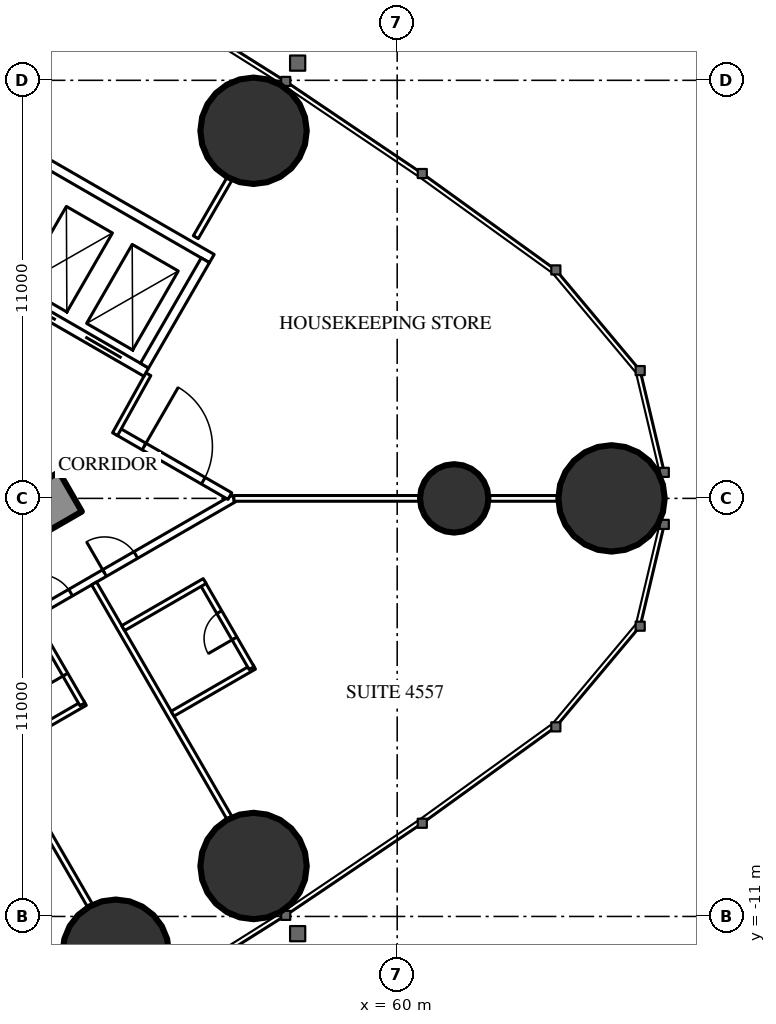
"""IFC4 building model, lengths in metres.
Left out: names, types, materials, properties, quantities, classifications, styles, units other than length and angle.
Written with IfcOpenShell. Run it as: python <this file> out.ifc"""

import sys

from ifc_helpers import new_model, si_unit, direction, frame, frame_2d, origin, origin_2d, place, context, subcontext, project, spatial, rectangle, circle, extrude, element, fill, save


model = new_model("IFC4")
c1 = context("Model", 3, precision=1e-05, world=origin(), true_north=direction((0.0, 1.0)))
c2 = subcontext(c1, "Body", "Model", "MODEL_VIEW")
j1 = project(units=[si_unit("LENGTHUNIT", "METRE"), si_unit("PLANEANGLEUNIT", "RADIAN")], contexts=[c1])
p1 = place(None, origin())
s1 = spatial("IfcSite", under=j1, at=p1, CompositionType="ELEMENT")
p2 = place(p1, origin())
s2 = spatial("IfcBuilding", under=s1, at=p2, CompositionType="ELEMENT")
p3 = place(p2, frame((0.0, 0.0, 170.3)))
s3 = spatial("IfcBuildingStorey", under=s2, at=p3, CompositionType="ELEMENT", Elevation=170.3)
for number, where, z_axis, x_axis in (
    (1, (65.64, 0.0, 0.0), (0.0, 0.0, 1.0), (1.0, 0.0, 0.0)),
    (2, (56.221, 9.672, 0.0), (0.0, 0.0, 1.0), (1.0, 0.0, 0.0)),
    (3, (52.594, -11.955, 0.0), (0.0, 0.0, 1.0), (1.0, 0.0, 0.0)),
    (4, (56.221, -9.672, 0.0), (0.0, 0.0, 1.0), (1.0, 0.0, 0.0)),
):
    element("IfcColumn", number, at=place(p3, frame(where, z_axis=z_axis, x_axis=x_axis)), inside=s3, PredefinedType="COLUMN", context=c2, shape_type="SweptSolid", body=[
        extrude(circle(Radius=1.4, at=origin_2d()), origin(), (0.0, 0.0, 1.0), 3.5),
    ])
p4 = place(p3, frame((61.5, 0.0, 0.0), z_axis=(0.0, 0.0, 1.0), x_axis=(1.0, 0.0, 0.0)))
e5 = element("IfcColumn", 5, at=p4, inside=s3, PredefinedType="COLUMN", context=c2, shape_type="SweptSolid", body=[
    extrude(circle(Radius=0.9, at=origin_2d()), origin(), (0.0, 0.0, 1.0), 3.5),
])
p5 = place(p3, frame((27.2, -13.8, 0.0), z_axis=(0.0, 0.0, 1.0), x_axis=(0.866027159892, 0.499996958321, 0.0)))
e6 = element("IfcWall", 6, at=p5, inside=s3, PredefinedType="SHEAR", context=c2, shape_type="SweptSolid", body=[
    extrude(rectangle(XDim=27.947, YDim=1.2, at=frame_2d((13.973, 0.0))), origin(), (0.0, 0.0, 1.0), 3.5),
])
p6 = place(p5, frame((4.6, 0.0, 0.0)))
e7 = element("IfcOpeningElement", 7, at=p6, cuts=e6, PredefinedType="OPENING", context=c2, shape_type="SweptSolid", body=[
    extrude(rectangle(XDim=1.0, YDim=2.2, at=frame_2d((0.5, 1.1))), frame((0.0, 0.61, 0.0), z_axis=(0.0, -1.0, 0.0), x_axis=(1.0, 0.0, 0.0)), (0.0, 0.0, 1.0), 1.22),
])
p7 = place(p5, frame((13.395, 0.0, 0.0)))
e8 = element("IfcOpeningElement", 8, at=p7, cuts=e6, PredefinedType="OPENING", context=c2, shape_type="SweptSolid", body=[
    extrude(rectangle(XDim=1.8, YDim=2.2, at=frame_2d((0.9, 1.1))), frame((0.0, 0.61, 0.0), z_axis=(0.0, -1.0, 0.0), x_axis=(1.0, 0.0, 0.0)), (0.0, 0.0, 1.0), 1.22),
])
p8 = place(p3, frame((27.959, -16.017, 0.0), z_axis=(0.0, 0.0, 1.0), x_axis=(0.866024151371, 0.500002169237, 0.0)))
e9 = element("IfcWall", 9, at=p8, inside=s3, PredefinedType="PARTITIONING", context=c2, shape_type="SweptSolid", body=[
    extrude(rectangle(XDim=32.034, YDim=0.2, at=frame_2d((16.017, 0.0))), origin(), (0.0, 0.0, 1.0), 3.25),
])
p9 = place(p8, frame((4.765, 0.0, 0.0)))
e10 = element("IfcOpeningElement", 10, at=p9, cuts=e9, PredefinedType="OPENING", context=c2, shape_type="SweptSolid", body=[
    extrude(rectangle(XDim=0.95, YDim=2.2, at=frame_2d((0.475, 1.1))), frame((0.0, 0.11, 0.0), z_axis=(0.0, -1.0, 0.0), x_axis=(1.0, 0.0, 0.0)), (0.0, 0.0, 1.0), 0.22),
])
p10 = place(p8, frame((9.215, 0.0, 0.0)))
e11 = element("IfcOpeningElement", 11, at=p10, cuts=e9, PredefinedType="OPENING", context=c2, shape_type="SweptSolid", body=[
    extrude(rectangle(XDim=1.0, YDim=2.2, at=frame_2d((0.5, 1.1))), frame((0.0, 0.11, 0.0), z_axis=(0.0, -1.0, 0.0), x_axis=(1.0, 0.0, 0.0)), (0.0, 0.0, 1.0), 0.22),
])
p11 = place(p8, frame((19.725, 0.0, 0.0)))
e12 = element("IfcOpeningElement", 12, at=p11, cuts=e9, PredefinedType="OPENING", context=c2, shape_type="SweptSolid", body=[
    extrude(rectangle(XDim=0.95, YDim=2.2, at=frame_2d((0.475, 1.1))), frame((0.0, 0.11, 0.0), z_axis=(0.0, -1.0, 0.0), x_axis=(1.0, 0.0, 0.0)), (0.0, 0.0, 1.0), 0.22),
])
p12 = place(p8, frame((26.125, 0.0, 0.0)))
e13 = element("IfcOpeningElement", 13, at=p12, cuts=e9, PredefinedType="OPENING", context=c2, shape_type="SweptSolid", body=[
    extrude(rectangle(XDim=0.95, YDim=2.2, at=frame_2d((0.475, 1.1))), frame((0.0, 0.11, 0.0), z_axis=(0.0, -1.0, 0.0), x_axis=(1.0, 0.0, 0.0)), (0.0, 0.0, 1.0), 0.22),
])
p13 = place(p8, frame((28.106, 0.0, 0.0)))
e14 = element("IfcOpeningElement", 14, at=p13, cuts=e9, PredefinedType="OPENING", context=c2, shape_type="SweptSolid", body=[
    extrude(rectangle(XDim=0.95, YDim=2.2, at=frame_2d((0.475, 1.1))), frame((0.0, 0.11, 0.0), z_axis=(0.0, -1.0, 0.0), x_axis=(1.0, 0.0, 0.0)), (0.0, 0.0, 1.0), 0.22),
])
p14 = place(p3, frame((48.275, -4.404, 0.0), z_axis=(0.0, 0.0, 1.0), x_axis=(0.500006004368, -0.866021937133, 0.0)))
e15 = element("IfcWall", 15, at=p14, inside=s3, PredefinedType="PARTITIONING", context=c2, shape_type="SweptSolid", body=[
    extrude(rectangle(XDim=7.279, YDim=0.15, at=frame_2d((3.64, 0.0))), origin(), (0.0, 0.0, 1.0), 2.3),
])
p15 = place(p3, frame((52.025, -2.238, 0.0), z_axis=(0.0, 0.0, 1.0), x_axis=(0.499983785035, -0.866034765296, 0.0)))
e16 = element("IfcWall", 16, at=p15, inside=s3, PredefinedType="PARTITIONING", context=c2, shape_type="SweptSolid", body=[
    extrude(rectangle(XDim=7.116, YDim=0.15, at=frame_2d((3.558, 0.0))), origin(), (0.0, 0.0, 1.0), 2.3),
])
p16 = place(p3, frame((55.702, 0.0, 0.0), z_axis=(0.0, 0.0, 1.0), x_axis=(1.0, 0.0, 0.0)))
e17 = element("IfcWall", 17, at=p16, inside=s3, PredefinedType="PARTITIONING", context=c2, shape_type="SweptSolid", body=[
    extrude(rectangle(XDim=8.518, YDim=0.15, at=frame_2d((4.259, 0.0))), origin(), (0.0, 0.0, 1.0), 2.3),
])
p17 = place(p3, frame((54.7, 6.872, 0.0), z_axis=(0.0, 0.0, 1.0), x_axis=(0.499989690894, 0.866031355668, 0.0)))
e18 = element("IfcWall", 18, at=p17, inside=s3, PredefinedType="PARTITIONING", context=c2, shape_type="SweptSolid", body=[
    extrude(rectangle(XDim=1.766, YDim=0.15, at=frame_2d((0.883, 0.0))), origin(), (0.0, 0.0, 1.0), 3.25),
])
p18 = place(p3, frame((52.639, 1.769, 0.0), z_axis=(0.0, 0.0, 1.0), x_axis=(0.866027340901, -0.4999966448, 0.0)))
e19 = element("IfcWall", 19, at=p18, inside=s3, PredefinedType="PARTITIONING", context=c2, shape_type="SweptSolid", body=[
    extrude(rectangle(XDim=3.417, YDim=0.2, at=frame_2d((1.708, 0.0))), origin(), (0.0, 0.0, 1.0), 3.25),
])
p19 = place(p18, frame((0.809, 0.0, 0.0)))
e20 = element("IfcOpeningElement", 20, at=p19, cuts=e19, PredefinedType="OPENING", context=c2, shape_type="SweptSolid", body=[
    extrude(rectangle(XDim=1.8, YDim=2.2, at=frame_2d((0.9, 1.1))), frame((0.0, 0.11, 0.0), z_axis=(0.0, -1.0, 0.0), x_axis=(1.0, 0.0, 0.0)), (0.0, 0.0, 1.0), 0.22),
])
p20 = place(p3, frame((52.576, 1.689, 0.0), z_axis=(0.0, 0.0, 1.0), x_axis=(0.485424724123, 0.874278466629, 0.0)))
e21 = element("IfcWall", 21, at=p20, inside=s3, PredefinedType="PARTITIONING", context=c2, shape_type="SweptSolid", body=[
    extrude(rectangle(XDim=1.805, YDim=0.15, at=frame_2d((0.903, 0.0))), origin(), (0.0, 0.0, 1.0), 3.25),
])
p21 = place(p3, frame((49.64, -6.618, 0.0), z_axis=(0.0, 0.0, 1.0), x_axis=(0.866006523861, 0.500032699561, 0.0)))
e22 = element("IfcWall", 22, at=p21, inside=s3, PredefinedType="PARTITIONING", context=c2, shape_type="SweptSolid", body=[
    extrude(rectangle(XDim=2.475, YDim=0.15, at=frame_2d((1.237, 0.0))), origin(), (0.0, 0.0, 1.0), 3.25),
])
p22 = place(p3, frame((50.418, -3.166, 0.0), z_axis=(0.0, 0.0, 1.0), x_axis=(0.499936506574, -0.866062058628, 0.0)))
e23 = element("IfcWall", 23, at=p22, inside=s3, PredefinedType="PARTITIONING", context=c2, shape_type="SweptSolid", body=[
    extrude(rectangle(XDim=2.6, YDim=0.15, at=frame_2d((1.3, 0.0))), origin(), (0.0, 0.0, 1.0), 3.25),
])
p23 = place(p22, frame((0.9, 0.0, 0.0)))
e24 = element("IfcOpeningElement", 24, at=p23, cuts=e23, PredefinedType="OPENING", context=c2, shape_type="SweptSolid", body=[
    extrude(rectangle(XDim=0.8, YDim=2.2, at=frame_2d((0.4, 1.1))), frame((0.0, 0.085, 0.0), z_axis=(0.0, -1.0, 0.0), x_axis=(1.0, 0.0, 0.0)), (0.0, 0.0, 1.0), 0.17),
])
p24 = place(p3, frame((54.09, -5.665, 0.0), z_axis=(0.0, 0.0, 1.0), x_axis=(0.866006523861, 0.500032699561, 0.0)))
e25 = element("IfcWall", 25, at=p24, inside=s3, PredefinedType="PARTITIONING", context=c2, shape_type="SweptSolid", body=[
    extrude(rectangle(XDim=2.475, YDim=0.15, at=frame_2d((1.237, 0.0))), origin(), (0.0, 0.0, 1.0), 3.25),
])
p25 = place(p3, frame((54.869, -2.213, 0.0), z_axis=(0.0, 0.0, 1.0), x_axis=(0.500047596559, -0.865997922154, 0.0)))
e26 = element("IfcWall", 26, at=p25, inside=s3, PredefinedType="PARTITIONING", context=c2, shape_type="SweptSolid", body=[
    extrude(rectangle(XDim=2.6, YDim=0.15, at=frame_2d((1.3, 0.0))), origin(), (0.0, 0.0, 1.0), 3.25),
])
p26 = place(p25, frame((0.9, 0.0, 0.0)))
e27 = element("IfcOpeningElement", 27, at=p26, cuts=e26, PredefinedType="OPENING", context=c2, shape_type="SweptSolid", body=[
    extrude(rectangle(XDim=0.8, YDim=2.2, at=frame_2d((0.4, 1.1))), frame((0.0, 0.085, 0.0), z_axis=(0.0, -1.0, 0.0), x_axis=(1.0, 0.0, 0.0)), (0.0, 0.0, 1.0), 0.17),
])
p27 = place(p3, frame((52.79, -3.413, 0.0), z_axis=(0.0, 0.0, 1.0), x_axis=(0.866006523861, 0.500032699561, 0.0)))
e28 = element("IfcWall", 28, at=p27, inside=s3, PredefinedType="PARTITIONING", context=c2, shape_type="SweptSolid", body=[
    extrude(rectangle(XDim=2.475, YDim=0.15, at=frame_2d((1.237, 0.0))), origin(), (0.0, 0.0, 1.0), 3.25),
])
p28 = place(p3, frame((47.681, 6.622, 0.0), z_axis=(0.0, 0.0, 1.0), x_axis=(0.86603344179, -0.499986077507, 0.0)))
e29 = element("IfcWall", 29, at=p28, inside=s3, PredefinedType="PARTITIONING", context=c2, shape_type="SweptSolid", body=[
    extrude(rectangle(XDim=6.6, YDim=0.25, at=frame_2d((3.3, 0.0))), origin(), (0.0, 0.0, 1.0), 3.25),
])
p29 = place(p28, frame((0.75, 0.0, 0.0)))
e30 = element("IfcOpeningElement", 30, at=p29, cuts=e29, PredefinedType="OPENING", context=c2, shape_type="SweptSolid", body=[
    extrude(rectangle(XDim=1.1, YDim=2.2, at=frame_2d((0.55, 1.1))), frame((0.0, 0.135, 0.0), z_axis=(0.0, -1.0, 0.0), x_axis=(1.0, 0.0, 0.0)), (0.0, 0.0, 1.0), 0.27),
])
p30 = place(p28, frame((2.75, 0.0, 0.0)))
e31 = element("IfcOpeningElement", 31, at=p30, cuts=e29, PredefinedType="OPENING", context=c2, shape_type="SweptSolid", body=[
    extrude(rectangle(XDim=1.1, YDim=2.2, at=frame_2d((0.55, 1.1))), frame((0.0, 0.135, 0.0), z_axis=(0.0, -1.0, 0.0), x_axis=(1.0, 0.0, 0.0)), (0.0, 0.0, 1.0), 0.27),
])
p31 = place(p28, frame((4.75, 0.0, 0.0)))
e32 = element("IfcOpeningElement", 32, at=p31, cuts=e29, PredefinedType="OPENING", context=c2, shape_type="SweptSolid", body=[
    extrude(rectangle(XDim=1.1, YDim=2.2, at=frame_2d((0.55, 1.1))), frame((0.0, 0.135, 0.0), z_axis=(0.0, -1.0, 0.0), x_axis=(1.0, 0.0, 0.0)), (0.0, 0.0, 1.0), 0.27),
])
p32 = place(p3, frame((49.406, 9.611, 0.0), z_axis=(0.0, 0.0, 1.0), x_axis=(0.86603344179, -0.499986077507, 0.0)))
e33 = element("IfcWall", 33, at=p32, inside=s3, PredefinedType="PARTITIONING", context=c2, shape_type="SweptSolid", body=[
    extrude(rectangle(XDim=6.6, YDim=0.25, at=frame_2d((3.3, 0.0))), origin(), (0.0, 0.0, 1.0), 3.25),
])
p33 = place(p3, frame((53.352, 3.493, 0.0), z_axis=(0.0, 0.0, 1.0), x_axis=(0.499872130319, 0.866099216793, 0.0)))
e34 = element("IfcWall", 34, at=p33, inside=s3, PredefinedType="PARTITIONING", context=c2, shape_type="SweptSolid", body=[
    extrude(rectangle(XDim=3.2, YDim=0.25, at=frame_2d((1.6, 0.0))), origin(), (0.0, 0.0, 1.0), 3.25),
])
p34 = place(p23, origin())
e35 = element("IfcDoor", 35, at=p34, inside=s3, OperationType="SINGLE_SWING_RIGHT", PredefinedType="DOOR", context=c2, shape_type="SweptSolid", body=[
    extrude(rectangle(XDim=0.8, YDim=2.2, at=frame_2d((0.4, 1.1))), frame((0.0, 0.025, 0.0), z_axis=(0.0, -1.0, 0.0), x_axis=(1.0, 0.0, 0.0)), (0.0, 0.0, 1.0), 0.05),
])
fill(e24, e35)
p35 = place(p12, origin())
e36 = element("IfcDoor", 36, at=p35, inside=s3, OperationType="SINGLE_SWING_LEFT", PredefinedType="DOOR", context=c2, shape_type="SweptSolid", body=[
    extrude(rectangle(XDim=0.95, YDim=2.2, at=frame_2d((0.475, 1.1))), frame((0.0, 0.025, 0.0), z_axis=(0.0, -1.0, 0.0), x_axis=(1.0, 0.0, 0.0)), (0.0, 0.0, 1.0), 0.05),
])
fill(e13, e36)
p36 = place(p26, origin())
e37 = element("IfcDoor", 37, at=p36, inside=s3, OperationType="SINGLE_SWING_RIGHT", PredefinedType="DOOR", context=c2, shape_type="SweptSolid", body=[
    extrude(rectangle(XDim=0.8, YDim=2.2, at=frame_2d((0.4, 1.1))), frame((0.0, 0.025, 0.0), z_axis=(0.0, -1.0, 0.0), x_axis=(1.0, 0.0, 0.0)), (0.0, 0.0, 1.0), 0.05),
])
fill(e27, e37)
p37 = place(p13, origin())
e38 = element("IfcDoor", 38, at=p37, inside=s3, OperationType="SINGLE_SWING_LEFT", PredefinedType="DOOR", context=c2, shape_type="SweptSolid", body=[
    extrude(rectangle(XDim=0.95, YDim=2.2, at=frame_2d((0.475, 1.1))), frame((0.0, 0.025, 0.0), z_axis=(0.0, -1.0, 0.0), x_axis=(1.0, 0.0, 0.0)), (0.0, 0.0, 1.0), 0.05),
])
fill(e14, e38)
p38 = place(p19, origin())
e39 = element("IfcDoor", 39, at=p38, inside=s3, OperationType="DOUBLE_DOOR_SINGLE_SWING", PredefinedType="DOOR", context=c2, shape_type="SweptSolid", body=[
    extrude(rectangle(XDim=1.8, YDim=2.2, at=frame_2d((0.9, 1.1))), frame((0.0, 0.025, 0.0), z_axis=(0.0, -1.0, 0.0), x_axis=(1.0, 0.0, 0.0)), (0.0, 0.0, 1.0), 0.05),
])
fill(e20, e39)
p39 = place(p30, origin())
e40 = element("IfcDoor", 40, at=p39, inside=s3, OperationType="DOUBLE_DOOR_SLIDING", PredefinedType="USERDEFINED", context=c2, shape_type="SweptSolid", body=[
    extrude(rectangle(XDim=1.1, YDim=2.2, at=frame_2d((0.55, 1.1))), frame((0.0, 0.025, 0.0), z_axis=(0.0, -1.0, 0.0), x_axis=(1.0, 0.0, 0.0)), (0.0, 0.0, 1.0), 0.05),
])
fill(e31, e40)
p40 = place(p31, origin())
e41 = element("IfcDoor", 41, at=p40, inside=s3, OperationType="DOUBLE_DOOR_SLIDING", PredefinedType="USERDEFINED", context=c2, shape_type="SweptSolid", body=[
    extrude(rectangle(XDim=1.1, YDim=2.2, at=frame_2d((0.55, 1.1))), frame((0.0, 0.025, 0.0), z_axis=(0.0, -1.0, 0.0), x_axis=(1.0, 0.0, 0.0)), (0.0, 0.0, 1.0), 0.05),
])
fill(e32, e41)
save(model, sys.argv[1])
